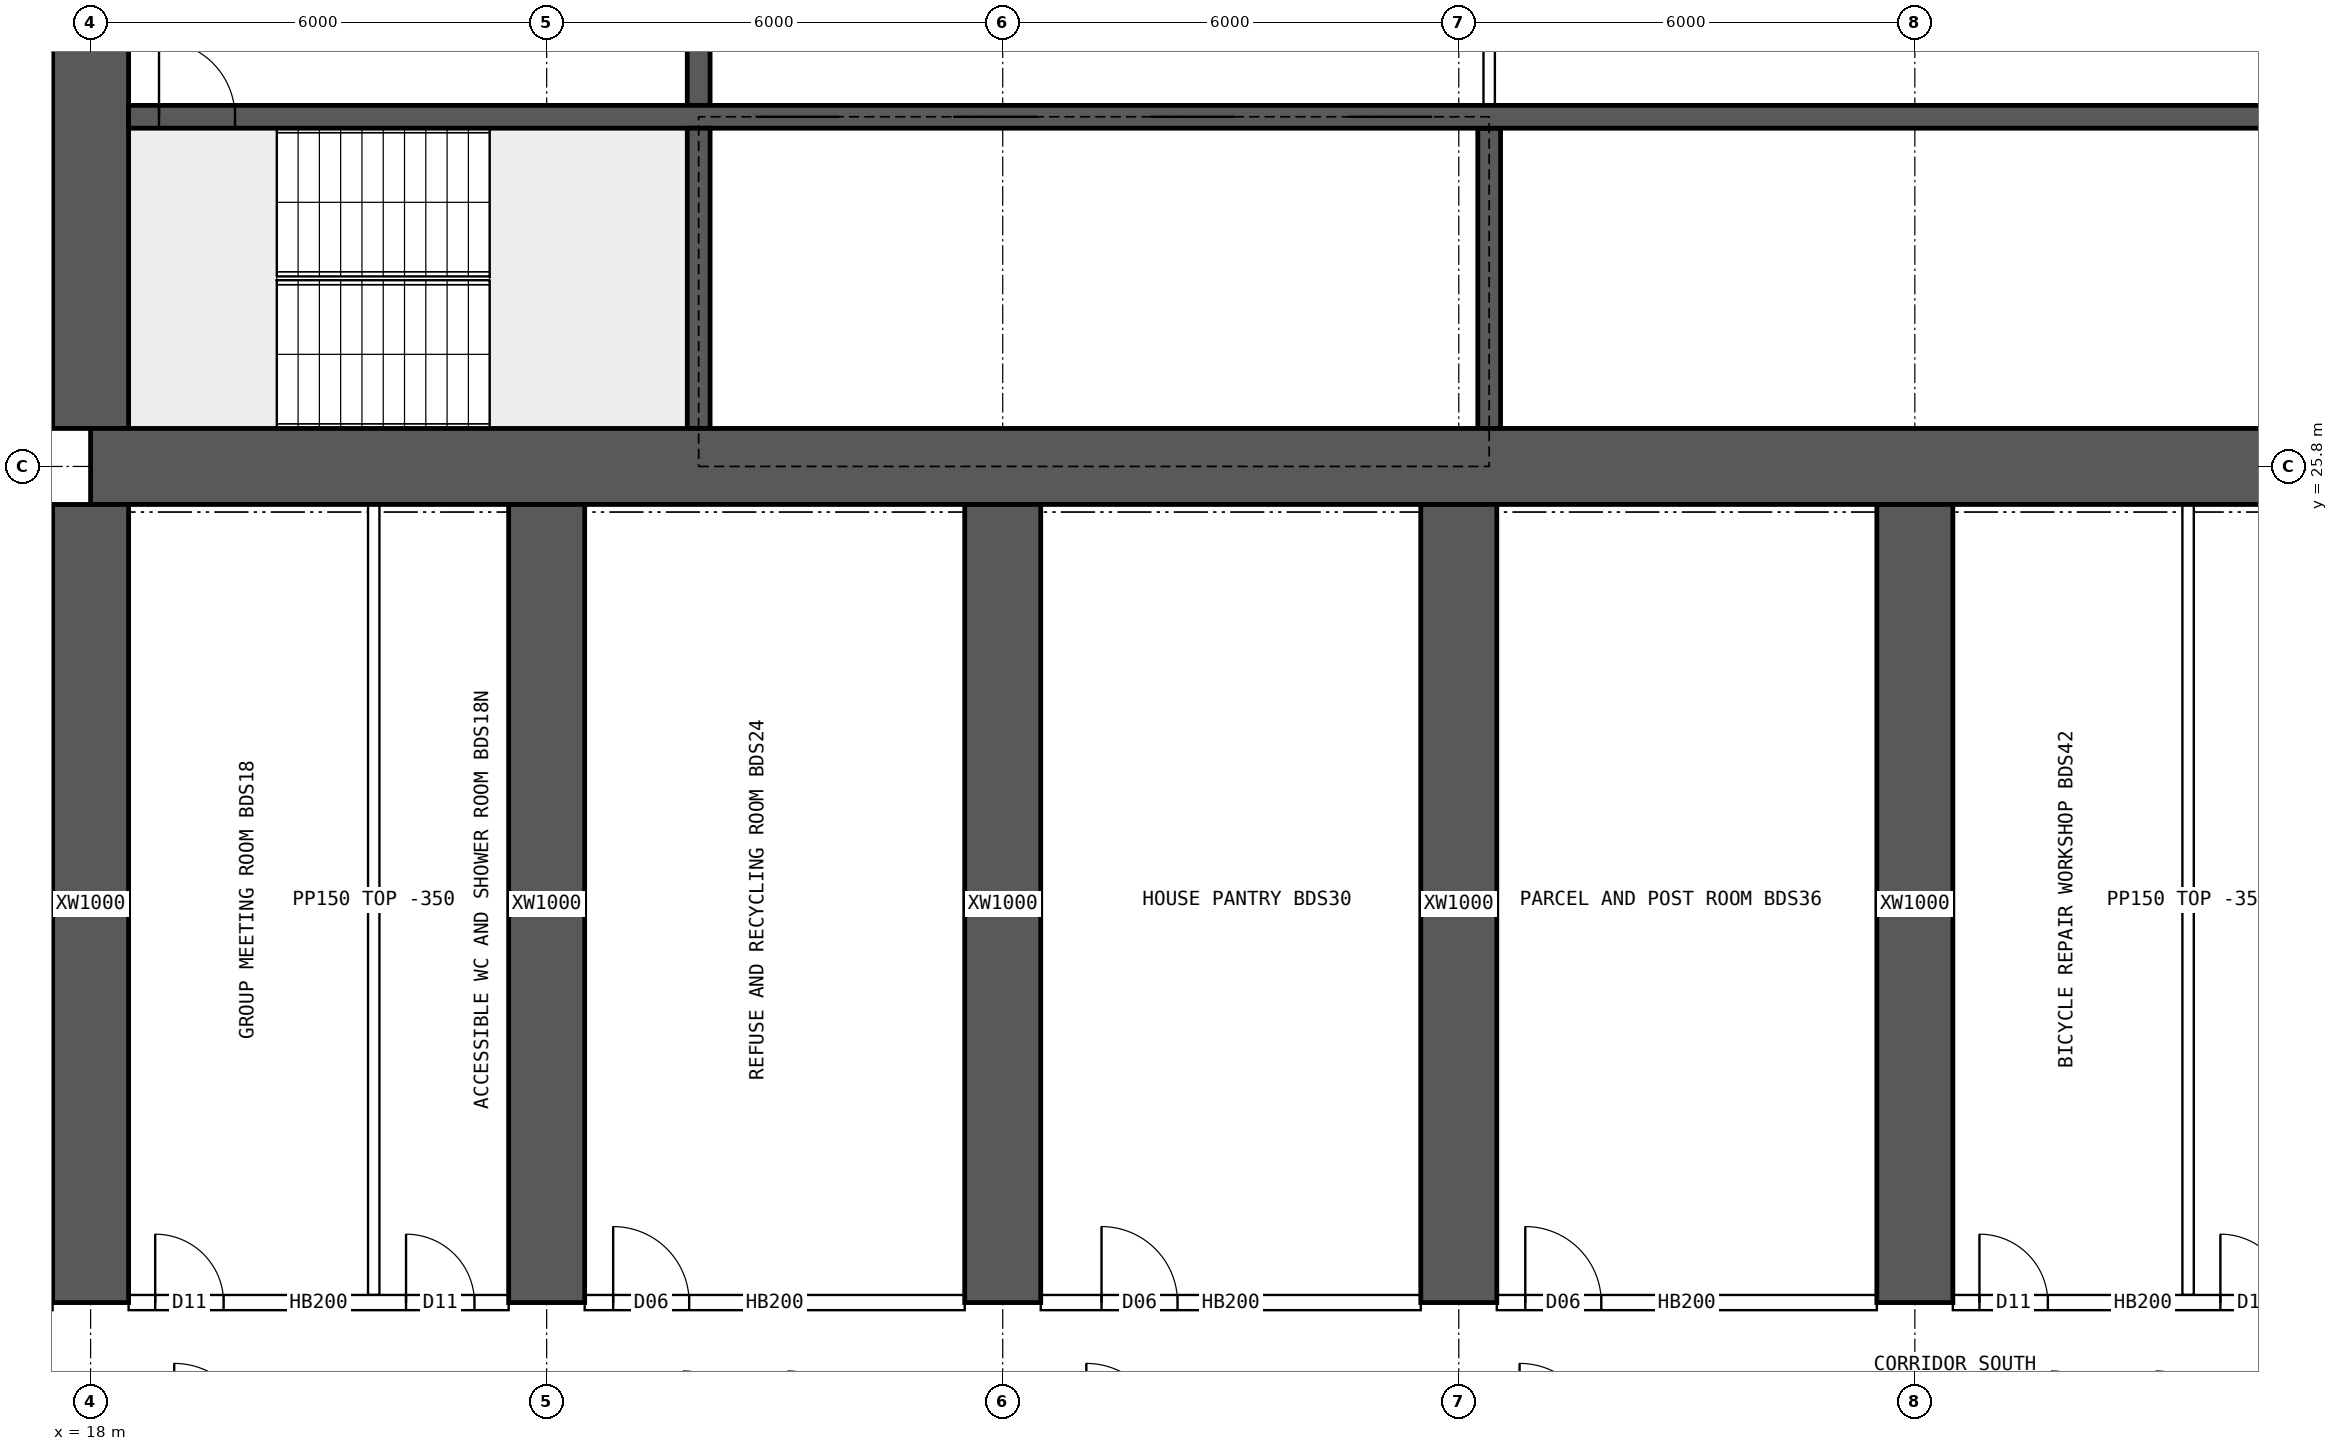
"""IFC4 building model, lengths in metres.
Left out: names, types, materials, properties, quantities, classifications, styles, units other than length and angle.
Written with IfcOpenShell. Run it as: python <this file> out.ifc"""

import sys

from ifc_helpers import new_model, si_unit, direction, frame, frame_2d, origin, place, context, subcontext, project, spatial, rectangle, extrude, element, fill, save


model = new_model("IFC4")
c1 = context("Model", 3, precision=1e-05, world=origin(), true_north=direction((0.0, 1.0)))
c2 = subcontext(c1, "Body", "Model", "MODEL_VIEW")
j1 = project(units=[si_unit("LENGTHUNIT", "METRE"), si_unit("PLANEANGLEUNIT", "RADIAN")], contexts=[c1])
p1 = place(None, origin())
s1 = spatial("IfcSite", under=j1, at=p1, CompositionType="ELEMENT")
p2 = place(p1, origin())
s2 = spatial("IfcBuilding", under=s1, at=p2, CompositionType="ELEMENT")
p3 = place(p2, frame((0.0, 0.0, 65.2)))
s3 = spatial("IfcBuildingStorey", under=s2, at=p3, CompositionType="ELEMENT", Elevation=65.2)
p4 = place(p3, frame((18.0, 25.8, 0.0), z_axis=(0.0, 0.0, 1.0), x_axis=(1.0, 0.0, 0.0)))
e1 = element("IfcWall", 1, at=p4, inside=s3, PredefinedType="SHEAR", context=c2, shape_type="SweptSolid", body=[
    extrude(rectangle(XDim=48.0, YDim=1.0, at=frame_2d((24.0, 0.0))), origin(), (0.0, 0.0, 1.0), 3.75),
])
p5 = place(p3, frame((18.0, 26.3, 0.0), z_axis=(0.0, 0.0, 1.0), x_axis=(0.0, 1.0, 0.0)))
e2 = element("IfcWall", 2, at=p5, inside=s3, PredefinedType="SHEAR", context=c2, shape_type="SweptSolid", body=[
    extrude(rectangle(XDim=11.4, YDim=1.0, at=frame_2d((5.7, 0.0))), origin(), (0.0, 0.0, 1.0), 3.75),
])
p6 = place(p5, frame((5.0, 0.0, 0.0)))
e3 = element("IfcOpeningElement", 3, at=p6, cuts=e2, PredefinedType="OPENING", context=c2, shape_type="SweptSolid", body=[
    extrude(rectangle(XDim=1.2, YDim=2.1, at=frame_2d((0.6, 1.05))), frame((0.0, 0.51, 0.0), z_axis=(0.0, -1.0, 0.0), x_axis=(1.0, 0.0, 0.0)), (0.0, 0.0, 1.0), 1.02),
])
p7 = place(p3, frame((18.5, 30.4, 0.0), z_axis=(0.0, 0.0, 1.0), x_axis=(1.0, 0.0, 0.0)))
e4 = element("IfcWall", 4, at=p7, inside=s3, PredefinedType="SHEAR", context=c2, shape_type="SweptSolid", body=[
    extrude(rectangle(XDim=47.0, YDim=0.3, at=frame_2d((23.5, 0.0))), origin(), (0.0, 0.0, 1.0), 3.75),
])
p8 = place(p7, frame((0.4, 0.0, 0.0)))
e5 = element("IfcOpeningElement", 5, at=p8, cuts=e4, PredefinedType="OPENING", context=c2, shape_type="SweptSolid", body=[
    extrude(rectangle(XDim=1.0, YDim=2.1, at=frame_2d((0.5, 1.05))), frame((0.0, 0.16, 0.0), z_axis=(0.0, -1.0, 0.0), x_axis=(1.0, 0.0, 0.0)), (0.0, 0.0, 1.0), 0.32),
])
p9 = place(p7, frame((45.6, 0.0, 0.0)))
e6 = element("IfcOpeningElement", 6, at=p9, cuts=e4, PredefinedType="OPENING", context=c2, shape_type="SweptSolid", body=[
    extrude(rectangle(XDim=1.0, YDim=2.1, at=frame_2d((0.5, 1.05))), frame((0.0, 0.16, 0.0), z_axis=(0.0, -1.0, 0.0), x_axis=(1.0, 0.0, 0.0)), (0.0, 0.0, 1.0), 0.32),
])
p10 = place(p7, frame((8.25, 0.0, 0.0)))
e7 = element("IfcOpeningElement", 7, at=p10, cuts=e4, PredefinedType="OPENING", context=c2, shape_type="SweptSolid", body=[
    extrude(rectangle(XDim=1.1, YDim=2.1, at=frame_2d((0.55, 1.05))), frame((0.0, 0.16, 0.0), z_axis=(0.0, -1.0, 0.0), x_axis=(1.0, 0.0, 0.0)), (0.0, 0.0, 1.0), 0.32),
])
p11 = place(p7, frame((10.85, 0.0, 0.0)))
e8 = element("IfcOpeningElement", 8, at=p11, cuts=e4, PredefinedType="OPENING", context=c2, shape_type="SweptSolid", body=[
    extrude(rectangle(XDim=1.1, YDim=2.1, at=frame_2d((0.55, 1.05))), frame((0.0, 0.16, 0.0), z_axis=(0.0, -1.0, 0.0), x_axis=(1.0, 0.0, 0.0)), (0.0, 0.0, 1.0), 0.32),
])
p12 = place(p7, frame((13.45, 0.0, 0.0)))
e9 = element("IfcOpeningElement", 9, at=p12, cuts=e4, PredefinedType="OPENING", context=c2, shape_type="SweptSolid", body=[
    extrude(rectangle(XDim=1.1, YDim=2.1, at=frame_2d((0.55, 1.05))), frame((0.0, 0.16, 0.0), z_axis=(0.0, -1.0, 0.0), x_axis=(1.0, 0.0, 0.0)), (0.0, 0.0, 1.0), 0.32),
])
p13 = place(p7, frame((16.05, 0.0, 0.0)))
e10 = element("IfcOpeningElement", 10, at=p13, cuts=e4, PredefinedType="OPENING", context=c2, shape_type="SweptSolid", body=[
    extrude(rectangle(XDim=1.1, YDim=2.1, at=frame_2d((0.55, 1.05))), frame((0.0, 0.16, 0.0), z_axis=(0.0, -1.0, 0.0), x_axis=(1.0, 0.0, 0.0)), (0.0, 0.0, 1.0), 0.32),
])
p14 = place(p7, frame((30.117, 0.0, 0.0)))
e11 = element("IfcOpeningElement", 11, at=p14, cuts=e4, PredefinedType="OPENING", context=c2, shape_type="SweptSolid", body=[
    extrude(rectangle(XDim=1.1, YDim=2.1, at=frame_2d((0.55, 1.05))), frame((0.0, 0.16, 0.0), z_axis=(0.0, -1.0, 0.0), x_axis=(1.0, 0.0, 0.0)), (0.0, 0.0, 1.0), 0.32),
])
p15 = place(p7, frame((33.65, 0.0, 0.0)))
e12 = element("IfcOpeningElement", 12, at=p15, cuts=e4, PredefinedType="OPENING", context=c2, shape_type="SweptSolid", body=[
    extrude(rectangle(XDim=1.1, YDim=2.1, at=frame_2d((0.55, 1.05))), frame((0.0, 0.16, 0.0), z_axis=(0.0, -1.0, 0.0), x_axis=(1.0, 0.0, 0.0)), (0.0, 0.0, 1.0), 0.32),
])
p16 = place(p7, frame((37.183, 0.0, 0.0)))
e13 = element("IfcOpeningElement", 13, at=p16, cuts=e4, PredefinedType="OPENING", context=c2, shape_type="SweptSolid", body=[
    extrude(rectangle(XDim=1.1, YDim=2.1, at=frame_2d((0.55, 1.05))), frame((0.0, 0.16, 0.0), z_axis=(0.0, -1.0, 0.0), x_axis=(1.0, 0.0, 0.0)), (0.0, 0.0, 1.0), 0.32),
])
p17 = place(p3, frame((26.0, 26.3, 0.0), z_axis=(0.0, 0.0, 1.0), x_axis=(0.0, 1.0, 0.0)))
e14 = element("IfcWall", 14, at=p17, inside=s3, PredefinedType="SHEAR", context=c2, shape_type="SweptSolid", body=[
    extrude(rectangle(XDim=3.95, YDim=0.3, at=frame_2d((1.975, 0.0))), origin(), (0.0, 0.0, 1.0), 3.75),
])
p18 = place(p3, frame((26.0, 30.55, 0.0), z_axis=(0.0, 0.0, 1.0), x_axis=(0.0, 1.0, 0.0)))
e15 = element("IfcWall", 15, at=p18, inside=s3, PredefinedType="SHEAR", context=c2, shape_type="SweptSolid", body=[
    extrude(rectangle(XDim=3.9, YDim=0.3, at=frame_2d((1.95, 0.0))), origin(), (0.0, 0.0, 1.0), 3.75),
])
p19 = place(p18, frame((1.4, 0.0, 0.0)))
e16 = element("IfcOpeningElement", 16, at=p19, cuts=e15, PredefinedType="OPENING", context=c2, shape_type="SweptSolid", body=[
    extrude(rectangle(XDim=1.2, YDim=2.1, at=frame_2d((0.6, 1.05))), frame((0.0, 0.16, 0.0), z_axis=(0.0, -1.0, 0.0), x_axis=(1.0, 0.0, 0.0)), (0.0, 0.0, 1.0), 0.32),
])
p20 = place(p3, frame((36.4, 26.3, 0.0), z_axis=(0.0, 0.0, 1.0), x_axis=(0.0, 1.0, 0.0)))
e17 = element("IfcWall", 17, at=p20, inside=s3, PredefinedType="SHEAR", context=c2, shape_type="SweptSolid", body=[
    extrude(rectangle(XDim=3.95, YDim=0.3, at=frame_2d((1.975, 0.0))), origin(), (0.0, 0.0, 1.0), 3.75),
])
for number, where, z_axis, x_axis in (
    (18, (18.0, 14.8, 0.0), (0.0, 0.0, 1.0), (0.0, 1.0, 0.0)),
    (19, (24.0, 14.8, 0.0), (0.0, 0.0, 1.0), (0.0, 1.0, 0.0)),
    (20, (30.0, 14.8, 0.0), (0.0, 0.0, 1.0), (0.0, 1.0, 0.0)),
    (21, (36.0, 14.8, 0.0), (0.0, 0.0, 1.0), (0.0, 1.0, 0.0)),
    (22, (42.0, 14.8, 0.0), (0.0, 0.0, 1.0), (0.0, 1.0, 0.0)),
):
    element("IfcWall", number, at=place(p3, frame(where, z_axis=z_axis, x_axis=x_axis)), inside=s3, PredefinedType="SHEAR", context=c2, shape_type="SweptSolid", body=[
        extrude(rectangle(XDim=10.5, YDim=1.0, at=frame_2d((5.25, 0.0))), origin(), (0.0, 0.0, 1.0), 3.75),
    ])
p21 = place(p3, frame((36.4, 30.55, 0.0), z_axis=(0.0, 0.0, 1.0), x_axis=(0.0, 1.0, 0.0)))
e23 = element("IfcWall", 23, at=p21, inside=s3, PredefinedType="SOLIDWALL", context=c2, shape_type="SweptSolid", body=[
    extrude(rectangle(XDim=3.9, YDim=0.15, at=frame_2d((1.95, 0.0))), origin(), (0.0, 0.0, 1.0), 3.4),
])
p22 = place(p21, frame((1.15, 0.0, 0.0)))
e24 = element("IfcOpeningElement", 24, at=p22, cuts=e23, PredefinedType="OPENING", context=c2, shape_type="SweptSolid", body=[
    extrude(rectangle(XDim=1.6, YDim=2.1, at=frame_2d((0.8, 1.05))), frame((0.0, 0.085, 0.0), z_axis=(0.0, -1.0, 0.0), x_axis=(1.0, 0.0, 0.0)), (0.0, 0.0, 1.0), 0.17),
])
p23 = place(p3, frame((18.5, 14.8, 0.0), z_axis=(0.0, 0.0, 1.0), x_axis=(1.0, 0.0, 0.0)))
e25 = element("IfcWall", 25, at=p23, inside=s3, PredefinedType="SOLIDWALL", context=c2, shape_type="SweptSolid", body=[
    extrude(rectangle(XDim=5.0, YDim=0.2, at=frame_2d((2.5, 0.0))), origin(), (0.0, 0.0, 1.0), 3.4),
])
p24 = place(p23, frame((0.35, 0.0, 0.0)))
e26 = element("IfcOpeningElement", 26, at=p24, cuts=e25, PredefinedType="OPENING", context=c2, shape_type="SweptSolid", body=[
    extrude(rectangle(XDim=0.9, YDim=2.1, at=frame_2d((0.45, 1.05))), frame((0.0, 0.11, 0.0), z_axis=(0.0, -1.0, 0.0), x_axis=(1.0, 0.0, 0.0)), (0.0, 0.0, 1.0), 0.22),
])
p25 = place(p23, frame((3.65, 0.0, 0.0)))
e27 = element("IfcOpeningElement", 27, at=p25, cuts=e25, PredefinedType="OPENING", context=c2, shape_type="SweptSolid", body=[
    extrude(rectangle(XDim=0.9, YDim=2.1, at=frame_2d((0.45, 1.05))), frame((0.0, 0.11, 0.0), z_axis=(0.0, -1.0, 0.0), x_axis=(1.0, 0.0, 0.0)), (0.0, 0.0, 1.0), 0.22),
])
p26 = place(p3, frame((24.5, 14.8, 0.0), z_axis=(0.0, 0.0, 1.0), x_axis=(1.0, 0.0, 0.0)))
e28 = element("IfcWall", 28, at=p26, inside=s3, PredefinedType="SOLIDWALL", context=c2, shape_type="SweptSolid", body=[
    extrude(rectangle(XDim=5.0, YDim=0.2, at=frame_2d((2.5, 0.0))), origin(), (0.0, 0.0, 1.0), 3.4),
])
p27 = place(p26, frame((0.375, 0.0, 0.0)))
e29 = element("IfcOpeningElement", 29, at=p27, cuts=e28, PredefinedType="OPENING", context=c2, shape_type="SweptSolid", body=[
    extrude(rectangle(XDim=1.0, YDim=2.1, at=frame_2d((0.5, 1.05))), frame((0.0, 0.11, 0.0), z_axis=(0.0, -1.0, 0.0), x_axis=(1.0, 0.0, 0.0)), (0.0, 0.0, 1.0), 0.22),
])
p28 = place(p3, frame((30.5, 14.8, 0.0), z_axis=(0.0, 0.0, 1.0), x_axis=(1.0, 0.0, 0.0)))
e30 = element("IfcWall", 30, at=p28, inside=s3, PredefinedType="SOLIDWALL", context=c2, shape_type="SweptSolid", body=[
    extrude(rectangle(XDim=5.0, YDim=0.2, at=frame_2d((2.5, 0.0))), origin(), (0.0, 0.0, 1.0), 3.4),
])
p29 = place(p28, frame((0.8, 0.0, 0.0)))
e31 = element("IfcOpeningElement", 31, at=p29, cuts=e30, PredefinedType="OPENING", context=c2, shape_type="SweptSolid", body=[
    extrude(rectangle(XDim=1.0, YDim=2.1, at=frame_2d((0.5, 1.05))), frame((0.0, 0.11, 0.0), z_axis=(0.0, -1.0, 0.0), x_axis=(1.0, 0.0, 0.0)), (0.0, 0.0, 1.0), 0.22),
])
p30 = place(p3, frame((36.5, 14.8, 0.0), z_axis=(0.0, 0.0, 1.0), x_axis=(1.0, 0.0, 0.0)))
e32 = element("IfcWall", 32, at=p30, inside=s3, PredefinedType="SOLIDWALL", context=c2, shape_type="SweptSolid", body=[
    extrude(rectangle(XDim=5.0, YDim=0.2, at=frame_2d((2.5, 0.0))), origin(), (0.0, 0.0, 1.0), 3.4),
])
p31 = place(p30, frame((0.375, 0.0, 0.0)))
e33 = element("IfcOpeningElement", 33, at=p31, cuts=e32, PredefinedType="OPENING", context=c2, shape_type="SweptSolid", body=[
    extrude(rectangle(XDim=1.0, YDim=2.1, at=frame_2d((0.5, 1.05))), frame((0.0, 0.11, 0.0), z_axis=(0.0, -1.0, 0.0), x_axis=(1.0, 0.0, 0.0)), (0.0, 0.0, 1.0), 0.22),
])
p32 = place(p3, frame((42.5, 14.8, 0.0), z_axis=(0.0, 0.0, 1.0), x_axis=(1.0, 0.0, 0.0)))
e34 = element("IfcWall", 34, at=p32, inside=s3, PredefinedType="SOLIDWALL", context=c2, shape_type="SweptSolid", body=[
    extrude(rectangle(XDim=5.0, YDim=0.2, at=frame_2d((2.5, 0.0))), origin(), (0.0, 0.0, 1.0), 3.4),
])
p33 = place(p32, frame((0.35, 0.0, 0.0)))
e35 = element("IfcOpeningElement", 35, at=p33, cuts=e34, PredefinedType="OPENING", context=c2, shape_type="SweptSolid", body=[
    extrude(rectangle(XDim=0.9, YDim=2.1, at=frame_2d((0.45, 1.05))), frame((0.0, 0.11, 0.0), z_axis=(0.0, -1.0, 0.0), x_axis=(1.0, 0.0, 0.0)), (0.0, 0.0, 1.0), 0.22),
])
p34 = place(p32, frame((3.52, 0.0, 0.0)))
e36 = element("IfcOpeningElement", 36, at=p34, cuts=e34, PredefinedType="OPENING", context=c2, shape_type="SweptSolid", body=[
    extrude(rectangle(XDim=0.9, YDim=2.1, at=frame_2d((0.45, 1.05))), frame((0.0, 0.11, 0.0), z_axis=(0.0, -1.0, 0.0), x_axis=(1.0, 0.0, 0.0)), (0.0, 0.0, 1.0), 0.22),
])
for number, where, z_axis, x_axis in (
    (37, (21.725, 14.9, 0.0), (0.0, 0.0, 1.0), (0.0, 1.0, 0.0)),
    (38, (45.595, 14.9, 0.0), (0.0, 0.0, 1.0), (0.0, 1.0, 0.0)),
):
    element("IfcWall", number, at=place(p3, frame(where, z_axis=z_axis, x_axis=x_axis)), inside=s3, PredefinedType="PARTITIONING", context=c2, shape_type="SweptSolid", body=[
        extrude(rectangle(XDim=10.4, YDim=0.15, at=frame_2d((5.2, 0.0))), origin(), (0.0, 0.0, 1.0), 3.4),
    ])
p35 = place(p8, origin())
e39 = element("IfcDoor", 39, at=p35, inside=s3, OperationType="SINGLE_SWING_LEFT", PredefinedType="DOOR", context=c2, shape_type="SweptSolid", body=[
    extrude(rectangle(XDim=1.0, YDim=2.1, at=frame_2d((0.5, 1.05))), frame((0.0, 0.025, 0.0), z_axis=(0.0, -1.0, 0.0), x_axis=(1.0, 0.0, 0.0)), (0.0, 0.0, 1.0), 0.05),
])
fill(e5, e39)
p36 = place(p10, origin())
e40 = element("IfcDoor", 40, at=p36, inside=s3, OperationType="DOUBLE_DOOR_SLIDING", PredefinedType="DOOR", context=c2, shape_type="SweptSolid", body=[
    extrude(rectangle(XDim=1.1, YDim=2.1, at=frame_2d((0.55, 1.05))), frame((0.0, 0.025, 0.0), z_axis=(0.0, -1.0, 0.0), x_axis=(1.0, 0.0, 0.0)), (0.0, 0.0, 1.0), 0.05),
])
fill(e7, e40)
p37 = place(p11, origin())
e41 = element("IfcDoor", 41, at=p37, inside=s3, OperationType="DOUBLE_DOOR_SLIDING", PredefinedType="DOOR", context=c2, shape_type="SweptSolid", body=[
    extrude(rectangle(XDim=1.1, YDim=2.1, at=frame_2d((0.55, 1.05))), frame((0.0, 0.025, 0.0), z_axis=(0.0, -1.0, 0.0), x_axis=(1.0, 0.0, 0.0)), (0.0, 0.0, 1.0), 0.05),
])
fill(e8, e41)
p38 = place(p12, origin())
e42 = element("IfcDoor", 42, at=p38, inside=s3, OperationType="DOUBLE_DOOR_SLIDING", PredefinedType="DOOR", context=c2, shape_type="SweptSolid", body=[
    extrude(rectangle(XDim=1.1, YDim=2.1, at=frame_2d((0.55, 1.05))), frame((0.0, 0.025, 0.0), z_axis=(0.0, -1.0, 0.0), x_axis=(1.0, 0.0, 0.0)), (0.0, 0.0, 1.0), 0.05),
])
fill(e9, e42)
p39 = place(p13, origin())
e43 = element("IfcDoor", 43, at=p39, inside=s3, OperationType="DOUBLE_DOOR_SLIDING", PredefinedType="DOOR", context=c2, shape_type="SweptSolid", body=[
    extrude(rectangle(XDim=1.1, YDim=2.1, at=frame_2d((0.55, 1.05))), frame((0.0, 0.025, 0.0), z_axis=(0.0, -1.0, 0.0), x_axis=(1.0, 0.0, 0.0)), (0.0, 0.0, 1.0), 0.05),
])
fill(e10, e43)
p40 = place(p24, origin())
e44 = element("IfcDoor", 44, at=p40, inside=s3, OperationType="SINGLE_SWING_LEFT", PredefinedType="DOOR", context=c2, shape_type="SweptSolid", body=[
    extrude(rectangle(XDim=0.9, YDim=2.1, at=frame_2d((0.45, 1.05))), frame((0.0, 0.025, 0.0), z_axis=(0.0, -1.0, 0.0), x_axis=(1.0, 0.0, 0.0)), (0.0, 0.0, 1.0), 0.05),
])
fill(e26, e44)
p41 = place(p25, origin())
e45 = element("IfcDoor", 45, at=p41, inside=s3, OperationType="SINGLE_SWING_LEFT", PredefinedType="DOOR", context=c2, shape_type="SweptSolid", body=[
    extrude(rectangle(XDim=0.9, YDim=2.1, at=frame_2d((0.45, 1.05))), frame((0.0, 0.025, 0.0), z_axis=(0.0, -1.0, 0.0), x_axis=(1.0, 0.0, 0.0)), (0.0, 0.0, 1.0), 0.05),
])
fill(e27, e45)
p42 = place(p27, origin())
e46 = element("IfcDoor", 46, at=p42, inside=s3, OperationType="SINGLE_SWING_LEFT", PredefinedType="DOOR", context=c2, shape_type="SweptSolid", body=[
    extrude(rectangle(XDim=1.0, YDim=2.1, at=frame_2d((0.5, 1.05))), frame((0.0, 0.025, 0.0), z_axis=(0.0, -1.0, 0.0), x_axis=(1.0, 0.0, 0.0)), (0.0, 0.0, 1.0), 0.05),
])
fill(e29, e46)
p43 = place(p29, origin())
e47 = element("IfcDoor", 47, at=p43, inside=s3, OperationType="SINGLE_SWING_LEFT", PredefinedType="DOOR", context=c2, shape_type="SweptSolid", body=[
    extrude(rectangle(XDim=1.0, YDim=2.1, at=frame_2d((0.5, 1.05))), frame((0.0, 0.025, 0.0), z_axis=(0.0, -1.0, 0.0), x_axis=(1.0, 0.0, 0.0)), (0.0, 0.0, 1.0), 0.05),
])
fill(e31, e47)
p44 = place(p31, origin())
e48 = element("IfcDoor", 48, at=p44, inside=s3, OperationType="SINGLE_SWING_LEFT", PredefinedType="DOOR", context=c2, shape_type="SweptSolid", body=[
    extrude(rectangle(XDim=1.0, YDim=2.1, at=frame_2d((0.5, 1.05))), frame((0.0, 0.025, 0.0), z_axis=(0.0, -1.0, 0.0), x_axis=(1.0, 0.0, 0.0)), (0.0, 0.0, 1.0), 0.05),
])
fill(e33, e48)
p45 = place(p33, origin())
e49 = element("IfcDoor", 49, at=p45, inside=s3, OperationType="SINGLE_SWING_LEFT", PredefinedType="DOOR", context=c2, shape_type="SweptSolid", body=[
    extrude(rectangle(XDim=0.9, YDim=2.1, at=frame_2d((0.45, 1.05))), frame((0.0, 0.025, 0.0), z_axis=(0.0, -1.0, 0.0), x_axis=(1.0, 0.0, 0.0)), (0.0, 0.0, 1.0), 0.05),
])
fill(e35, e49)
p46 = place(p34, origin())
e50 = element("IfcDoor", 50, at=p46, inside=s3, OperationType="SINGLE_SWING_LEFT", PredefinedType="DOOR", context=c2, shape_type="SweptSolid", body=[
    extrude(rectangle(XDim=0.9, YDim=2.1, at=frame_2d((0.45, 1.05))), frame((0.0, 0.025, 0.0), z_axis=(0.0, -1.0, 0.0), x_axis=(1.0, 0.0, 0.0)), (0.0, 0.0, 1.0), 0.05),
])
fill(e36, e50)
save(model, sys.argv[1])
